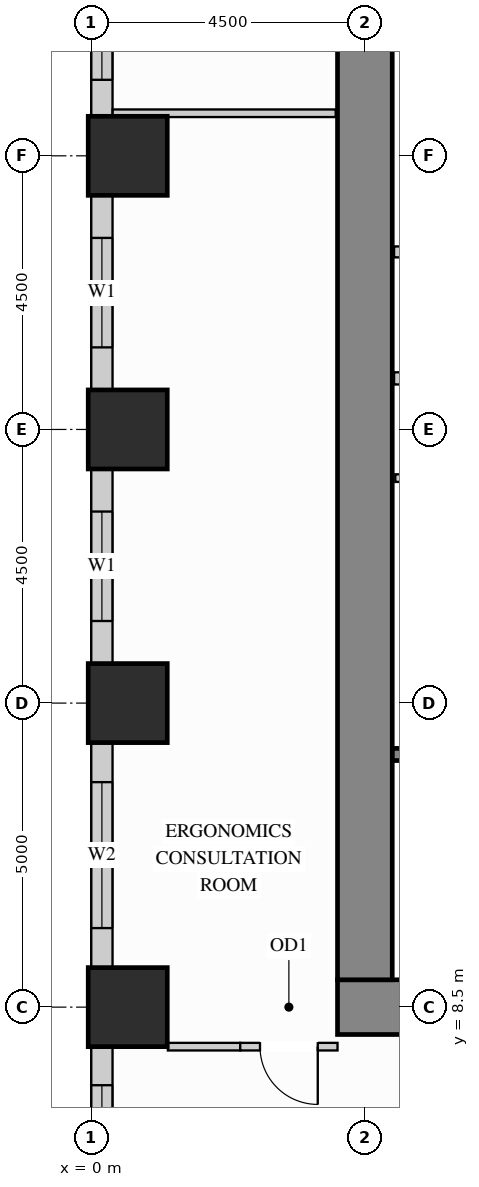
"""IFC4 building model, lengths in metres.
Left out: names, types, materials, properties, quantities, classifications, styles, units other than length and angle.
Written with IfcOpenShell. Run it as: python <this file> out.ifc"""

import sys

from ifc_helpers import new_model, si_unit, direction, frame, frame_2d, origin, origin_2d, place, context, subcontext, project, spatial, rectangle, extrude, source, transform, mapped, element, fill, save


model = new_model("IFC4")
c1 = context("Model", 3, precision=1e-05, world=origin(), true_north=direction((0.0, 1.0)))
c2 = subcontext(c1, "Body", "Model", "MODEL_VIEW")
j1 = project(units=[si_unit("LENGTHUNIT", "METRE"), si_unit("PLANEANGLEUNIT", "RADIAN")], contexts=[c1])
p1 = place(None, origin())
s1 = spatial("IfcSite", under=j1, at=p1, CompositionType="ELEMENT")
p2 = place(p1, origin())
s2 = spatial("IfcBuilding", under=s1, at=p2, CompositionType="ELEMENT")
p3 = place(p2, frame((0.0, 0.0, 54.9)))
s3 = spatial("IfcBuildingStorey", under=s2, at=p3, CompositionType="ELEMENT", Elevation=54.9)
m1 = source(origin(), c2, "Body", "SweptSolid", [
    extrude(rectangle(XDim=1.3, YDim=1.3, at=origin_2d()), origin(), (0.0, 0.0, 1.0), 3.38),
])
for number, where, z_axis, x_axis in (
    (1, (0.6, 13.5, 0.0), (0.0, 0.0, 1.0), (1.0, 0.0, 0.0)),
    (2, (0.6, 18.0, 0.0), (0.0, 0.0, 1.0), (1.0, 0.0, 0.0)),
    (3, (0.6, 22.5, 0.0), (0.0, 0.0, 1.0), (1.0, 0.0, 0.0)),
    (4, (0.6, 8.5, 0.0), (0.0, 0.0, 1.0), (1.0, 0.0, 0.0)),
):
    element("IfcColumn", number, at=place(p3, frame(where, z_axis=z_axis, x_axis=x_axis)), inside=s3, PredefinedType="COLUMN", context=c2, shape_type="MappedRepresentation", body=[
        mapped(m1, transform((0.0, 0.0, 0.0), x_axis=(1.0, 0.0, 0.0), y_axis=(0.0, 1.0, 0.0), z_axis=(0.0, 0.0, 1.0))),
    ])
m2 = source(origin(), c2, "Body", "SweptSolid", [
    extrude(rectangle(XDim=10.9, YDim=0.9, at=frame_2d((5.45, 0.0))), origin(), (0.0, 0.0, 1.0), 3.38),
])
p4 = place(p3, frame((4.05, 8.5, 0.0), z_axis=(0.0, 0.0, 1.0), x_axis=(1.0, 0.0, 0.0)))
e5 = element("IfcWall", 5, at=p4, inside=s3, PredefinedType="SHEAR", context=c2, shape_type="MappedRepresentation", body=[
    mapped(m2, transform((0.0, 0.0, 0.0), x_axis=(1.0, 0.0, 0.0), y_axis=(0.0, 1.0, 0.0), z_axis=(0.0, 0.0, 1.0))),
])
m3 = source(origin(), c2, "Body", "SweptSolid", [
    extrude(rectangle(XDim=20.1, YDim=0.9, at=frame_2d((10.05, 0.0))), origin(), (0.0, 0.0, 1.0), 3.38),
])
p5 = place(p3, frame((4.5, 8.95, 0.0), z_axis=(0.0, 0.0, 1.0), x_axis=(0.0, 1.0, 0.0)))
e6 = element("IfcWall", 6, at=p5, inside=s3, PredefinedType="SHEAR", context=c2, shape_type="MappedRepresentation", body=[
    mapped(m3, transform((0.0, 0.0, 0.0), x_axis=(1.0, 0.0, 0.0), y_axis=(0.0, 1.0, 0.0), z_axis=(0.0, 0.0, 1.0))),
])
p6 = place(p3, frame((0.175, 26.152, 0.0), z_axis=(0.0, 0.0, 1.0), x_axis=(0.0, -1.0, 0.0)))
e7 = element("IfcWall", 7, at=p6, inside=s3, PredefinedType="SOLIDWALL", context=c2, shape_type="SweptSolid", body=[
    extrude(rectangle(XDim=3.004, YDim=0.35, at=frame_2d((1.502, 0.0))), origin(), (0.0, 0.0, 1.0), 2.51),
])
p7 = place(p6, frame((0.602, 0.0, 0.78)))
e8 = element("IfcOpeningElement", 8, at=p7, cuts=e7, PredefinedType="OPENING", context=c2, shape_type="SweptSolid", body=[
    extrude(rectangle(XDim=1.8, YDim=1.55, at=frame_2d((0.9, 0.775))), frame((0.0, 0.185, 0.0), z_axis=(0.0, -1.0, 0.0), x_axis=(1.0, 0.0, 0.0)), (0.0, 0.0, 1.0), 0.37),
])
p8 = place(p3, frame((0.175, 21.852, 0.0), z_axis=(0.0, 0.0, 1.0), x_axis=(0.0, -1.0, 0.0)))
e9 = element("IfcWall", 9, at=p8, inside=s3, PredefinedType="SOLIDWALL", context=c2, shape_type="SweptSolid", body=[
    extrude(rectangle(XDim=3.204, YDim=0.35, at=frame_2d((1.602, 0.0))), origin(), (0.0, 0.0, 1.0), 2.51),
])
p9 = place(p8, frame((0.702, 0.0, 0.78)))
e10 = element("IfcOpeningElement", 10, at=p9, cuts=e9, PredefinedType="OPENING", context=c2, shape_type="SweptSolid", body=[
    extrude(rectangle(XDim=1.8, YDim=1.55, at=frame_2d((0.9, 0.775))), frame((0.0, 0.185, 0.0), z_axis=(0.0, -1.0, 0.0), x_axis=(1.0, 0.0, 0.0)), (0.0, 0.0, 1.0), 0.37),
])
p10 = place(p3, frame((0.175, 17.352, 0.0), z_axis=(0.0, 0.0, 1.0), x_axis=(0.0, -1.0, 0.0)))
e11 = element("IfcWall", 11, at=p10, inside=s3, PredefinedType="SOLIDWALL", context=c2, shape_type="SweptSolid", body=[
    extrude(rectangle(XDim=3.204, YDim=0.35, at=frame_2d((1.602, 0.0))), origin(), (0.0, 0.0, 1.0), 2.51),
])
p11 = place(p10, frame((0.702, 0.0, 0.78)))
e12 = element("IfcOpeningElement", 12, at=p11, cuts=e11, PredefinedType="OPENING", context=c2, shape_type="SweptSolid", body=[
    extrude(rectangle(XDim=1.8, YDim=1.55, at=frame_2d((0.9, 0.775))), frame((0.0, 0.185, 0.0), z_axis=(0.0, -1.0, 0.0), x_axis=(1.0, 0.0, 0.0)), (0.0, 0.0, 1.0), 0.37),
])
p12 = place(p3, frame((0.175, 12.852, 0.0), z_axis=(0.0, 0.0, 1.0), x_axis=(0.0, -1.0, 0.0)))
e13 = element("IfcWall", 13, at=p12, inside=s3, PredefinedType="SOLIDWALL", context=c2, shape_type="SweptSolid", body=[
    extrude(rectangle(XDim=3.704, YDim=0.35, at=frame_2d((1.852, 0.0))), origin(), (0.0, 0.0, 1.0), 2.51),
])
p13 = place(p12, frame((0.652, 0.0, 0.78)))
e14 = element("IfcOpeningElement", 14, at=p13, cuts=e13, PredefinedType="OPENING", context=c2, shape_type="SweptSolid", body=[
    extrude(rectangle(XDim=2.4, YDim=1.55, at=frame_2d((1.2, 0.775))), frame((0.0, 0.185, 0.0), z_axis=(0.0, -1.0, 0.0), x_axis=(1.0, 0.0, 0.0)), (0.0, 0.0, 1.0), 0.37),
])
p14 = place(p3, frame((0.175, 7.852, 0.0), z_axis=(0.0, 0.0, 1.0), x_axis=(0.0, -1.0, 0.0)))
e15 = element("IfcWall", 15, at=p14, inside=s3, PredefinedType="SOLIDWALL", context=c2, shape_type="SweptSolid", body=[
    extrude(rectangle(XDim=3.704, YDim=0.35, at=frame_2d((1.852, 0.0))), origin(), (0.0, 0.0, 1.0), 2.51),
])
p15 = place(p14, frame((0.636, 0.0, 0.78)))
e16 = element("IfcOpeningElement", 16, at=p15, cuts=e15, PredefinedType="OPENING", context=c2, shape_type="SweptSolid", body=[
    extrude(rectangle(XDim=1.8, YDim=1.55, at=frame_2d((0.9, 0.775))), frame((0.0, 0.185, 0.0), z_axis=(0.0, -1.0, 0.0), x_axis=(1.0, 0.0, 0.0)), (0.0, 0.0, 1.0), 0.37),
])
m4 = source(origin(), c2, "Body", "SweptSolid", [
    extrude(rectangle(XDim=2.17, YDim=0.18, at=frame_2d((1.085, 0.0))), origin(), (0.0, 0.0, 1.0), 3.365),
])
p16 = place(p3, frame((4.98, 20.92, 0.0), z_axis=(0.0, 0.0, 1.0), x_axis=(1.0, 0.0, 0.0)))
e17 = element("IfcWall", 17, at=p16, inside=s3, PredefinedType="PARTITIONING", context=c2, shape_type="MappedRepresentation", body=[
    mapped(m4, transform((0.0, 0.0, 0.0), x_axis=(1.0, 0.0, 0.0), y_axis=(0.0, 1.0, 0.0), z_axis=(0.0, 0.0, 1.0))),
])
p17 = place(p3, frame((5.0, 17.2, 0.0), z_axis=(0.0, 0.0, 1.0), x_axis=(1.0, 0.0, 0.0)))
e18 = element("IfcWall", 18, at=p17, inside=s3, PredefinedType="PARTITIONING", context=c2, shape_type="SweptSolid", body=[
    extrude(rectangle(XDim=2.4, YDim=0.125, at=frame_2d((1.2, 0.0))), origin(), (0.0, 0.0, 1.0), 3.365),
])
p18 = place(p17, frame((0.7, 0.0, 0.0)))
e19 = element("IfcOpeningElement", 19, at=p18, cuts=e18, PredefinedType="OPENING", context=c2, shape_type="SweptSolid", body=[
    extrude(rectangle(XDim=0.85, YDim=2.1, at=frame_2d((0.425, 1.05))), frame((0.0, 0.073, 0.0), z_axis=(0.0, -1.0, 0.0), x_axis=(1.0, 0.0, 0.0)), (0.0, 0.0, 1.0), 0.145),
])
m5 = source(origin(), c2, "Body", "SweptSolid", [
    extrude(rectangle(XDim=1.19, YDim=0.125, at=frame_2d((0.595, 0.0))), origin(), (0.0, 0.0, 1.0), 3.365),
])
p19 = place(p3, frame((1.26, 7.85, 0.0), z_axis=(0.0, 0.0, 1.0), x_axis=(1.0, 0.0, 0.0)))
e20 = element("IfcWall", 20, at=p19, inside=s3, PredefinedType="PARTITIONING", context=c2, shape_type="MappedRepresentation", body=[
    mapped(m5, transform((0.0, 0.0, 0.0), x_axis=(1.0, 0.0, 0.0), y_axis=(0.0, 1.0, 0.0), z_axis=(0.0, 0.0, 1.0))),
])
p20 = place(p3, frame((2.45, 7.85, 0.0), z_axis=(0.0, 0.0, 1.0), x_axis=(1.0, 0.0, 0.0)))
e21 = element("IfcWall", 21, at=p20, inside=s3, PredefinedType="PARTITIONING", context=c2, shape_type="SweptSolid", body=[
    extrude(rectangle(XDim=1.6, YDim=0.125, at=frame_2d((0.8, 0.0))), origin(), (0.0, 0.0, 1.0), 3.365),
])
p21 = place(p20, frame((0.325, 0.0, 0.0)))
e22 = element("IfcOpeningElement", 22, at=p21, cuts=e21, PredefinedType="OPENING", context=c2, shape_type="SweptSolid", body=[
    extrude(rectangle(XDim=0.95, YDim=2.15, at=frame_2d((0.475, 1.075))), frame((0.0, 0.073, 0.0), z_axis=(0.0, -1.0, 0.0), x_axis=(1.0, 0.0, 0.0)), (0.0, 0.0, 1.0), 0.145),
])
m6 = source(origin(), c2, "Body", "SweptSolid", [
    extrude(rectangle(XDim=3.668, YDim=0.125, at=frame_2d((1.834, 0.0))), origin(), (0.0, 0.0, 1.0), 3.365),
])
p22 = place(p3, frame((0.352, 23.2, 0.0), z_axis=(0.0, 0.0, 1.0), x_axis=(1.0, 0.0, 0.0)))
e23 = element("IfcWall", 23, at=p22, inside=s3, PredefinedType="PARTITIONING", context=c2, shape_type="MappedRepresentation", body=[
    mapped(m6, transform((0.0, 0.0, 0.0), x_axis=(1.0, 0.0, 0.0), y_axis=(0.0, 1.0, 0.0), z_axis=(0.0, 0.0, 1.0))),
])
m7 = source(origin(), c2, "Body", "SweptSolid", [
    extrude(rectangle(XDim=2.09, YDim=0.2, at=frame_2d((1.045, 0.0))), origin(), (0.0, 0.0, 1.0), 3.365),
])
p23 = place(p3, frame((4.98, 18.84, 0.0), z_axis=(0.0, 0.0, 1.0), x_axis=(1.0, 0.0, 0.0)))
e24 = element("IfcWall", 24, at=p23, inside=s3, PredefinedType="PARTITIONING", context=c2, shape_type="MappedRepresentation", body=[
    mapped(m7, transform((0.0, 0.0, 0.0), x_axis=(1.0, 0.0, 0.0), y_axis=(0.0, 1.0, 0.0), z_axis=(0.0, 0.0, 1.0))),
])
p24 = place(p3, frame((4.952, 12.655, 0.0), z_axis=(0.0, 0.0, 1.0), x_axis=(1.0, 0.0, 0.0)))
e25 = element("IfcWall", 25, at=p24, inside=s3, PredefinedType="SHEAR", context=c2, shape_type="SweptSolid", body=[
    extrude(rectangle(XDim=7.453, YDim=0.2, at=frame_2d((3.727, 0.0))), origin(), (0.0, 0.0, 1.0), 3.38),
])
p25 = place(p24, frame((0.4, 0.0, 0.0)))
e26 = element("IfcOpeningElement", 26, at=p25, cuts=e25, PredefinedType="OPENING", context=c2, shape_type="SweptSolid", body=[
    extrude(rectangle(XDim=1.1, YDim=2.15, at=frame_2d((0.55, 1.075))), frame((0.0, 0.11, 0.0), z_axis=(0.0, -1.0, 0.0), x_axis=(1.0, 0.0, 0.0)), (0.0, 0.0, 1.0), 0.22),
])
m8 = source(origin(), c2, "Body", "SweptSolid", [
    extrude(rectangle(XDim=0.95, YDim=2.15, at=frame_2d((0.475, 1.075))), frame((0.0, 0.025, 0.0), z_axis=(0.0, -1.0, 0.0), x_axis=(1.0, 0.0, 0.0)), (0.0, 0.0, 1.0), 0.05),
])
p26 = place(p21, origin())
e27 = element("IfcDoor", 27, at=p26, inside=s3, OperationType="SINGLE_SWING_RIGHT", PredefinedType="DOOR", context=c2, shape_type="MappedRepresentation", body=[
    mapped(m8, transform((0.0, 0.0, 0.0), x_axis=(1.0, 0.0, 0.0), y_axis=(0.0, 1.0, 0.0), z_axis=(0.0, 0.0, 1.0))),
])
fill(e22, e27)
m9 = source(origin(), c2, "Body", "SweptSolid", [
    extrude(rectangle(XDim=1.8, YDim=1.55, at=frame_2d((0.9, 0.775))), frame((0.0, 0.03, 0.0), z_axis=(0.0, -1.0, 0.0), x_axis=(1.0, 0.0, 0.0)), (0.0, 0.0, 1.0), 0.06),
])
p27 = place(p7, origin())
e28 = element("IfcWindow", 28, at=p27, inside=s3, PartitioningType="SINGLE_PANEL", PredefinedType="WINDOW", context=c2, shape_type="MappedRepresentation", body=[
    mapped(m9, transform((0.0, 0.0, 0.0), x_axis=(1.0, 0.0, 0.0), y_axis=(0.0, 1.0, 0.0), z_axis=(0.0, 0.0, 1.0))),
])
fill(e8, e28)
p28 = place(p9, origin())
e29 = element("IfcWindow", 29, at=p28, inside=s3, PartitioningType="SINGLE_PANEL", PredefinedType="WINDOW", context=c2, shape_type="MappedRepresentation", body=[
    mapped(m9, transform((0.0, 0.0, 0.0), x_axis=(1.0, 0.0, 0.0), y_axis=(0.0, 1.0, 0.0), z_axis=(0.0, 0.0, 1.0))),
])
fill(e10, e29)
p29 = place(p11, origin())
e30 = element("IfcWindow", 30, at=p29, inside=s3, PartitioningType="SINGLE_PANEL", PredefinedType="WINDOW", context=c2, shape_type="MappedRepresentation", body=[
    mapped(m9, transform((0.0, 0.0, 0.0), x_axis=(1.0, 0.0, 0.0), y_axis=(0.0, 1.0, 0.0), z_axis=(0.0, 0.0, 1.0))),
])
fill(e12, e30)
p30 = place(p15, origin())
e31 = element("IfcWindow", 31, at=p30, inside=s3, PartitioningType="SINGLE_PANEL", PredefinedType="WINDOW", context=c2, shape_type="MappedRepresentation", body=[
    mapped(m9, transform((0.0, 0.0, 0.0), x_axis=(1.0, 0.0, 0.0), y_axis=(0.0, 1.0, 0.0), z_axis=(0.0, 0.0, 1.0))),
])
fill(e16, e31)
m10 = source(origin(), c2, "Body", "SweptSolid", [
    extrude(rectangle(XDim=2.4, YDim=1.55, at=frame_2d((1.2, 0.775))), frame((0.0, 0.03, 0.0), z_axis=(0.0, -1.0, 0.0), x_axis=(1.0, 0.0, 0.0)), (0.0, 0.0, 1.0), 0.06),
])
p31 = place(p13, origin())
e32 = element("IfcWindow", 32, at=p31, inside=s3, PartitioningType="SINGLE_PANEL", PredefinedType="WINDOW", context=c2, shape_type="MappedRepresentation", body=[
    mapped(m10, transform((0.0, 0.0, 0.0), x_axis=(1.0, 0.0, 0.0), y_axis=(0.0, 1.0, 0.0), z_axis=(0.0, 0.0, 1.0))),
])
fill(e14, e32)
save(model, sys.argv[1])
